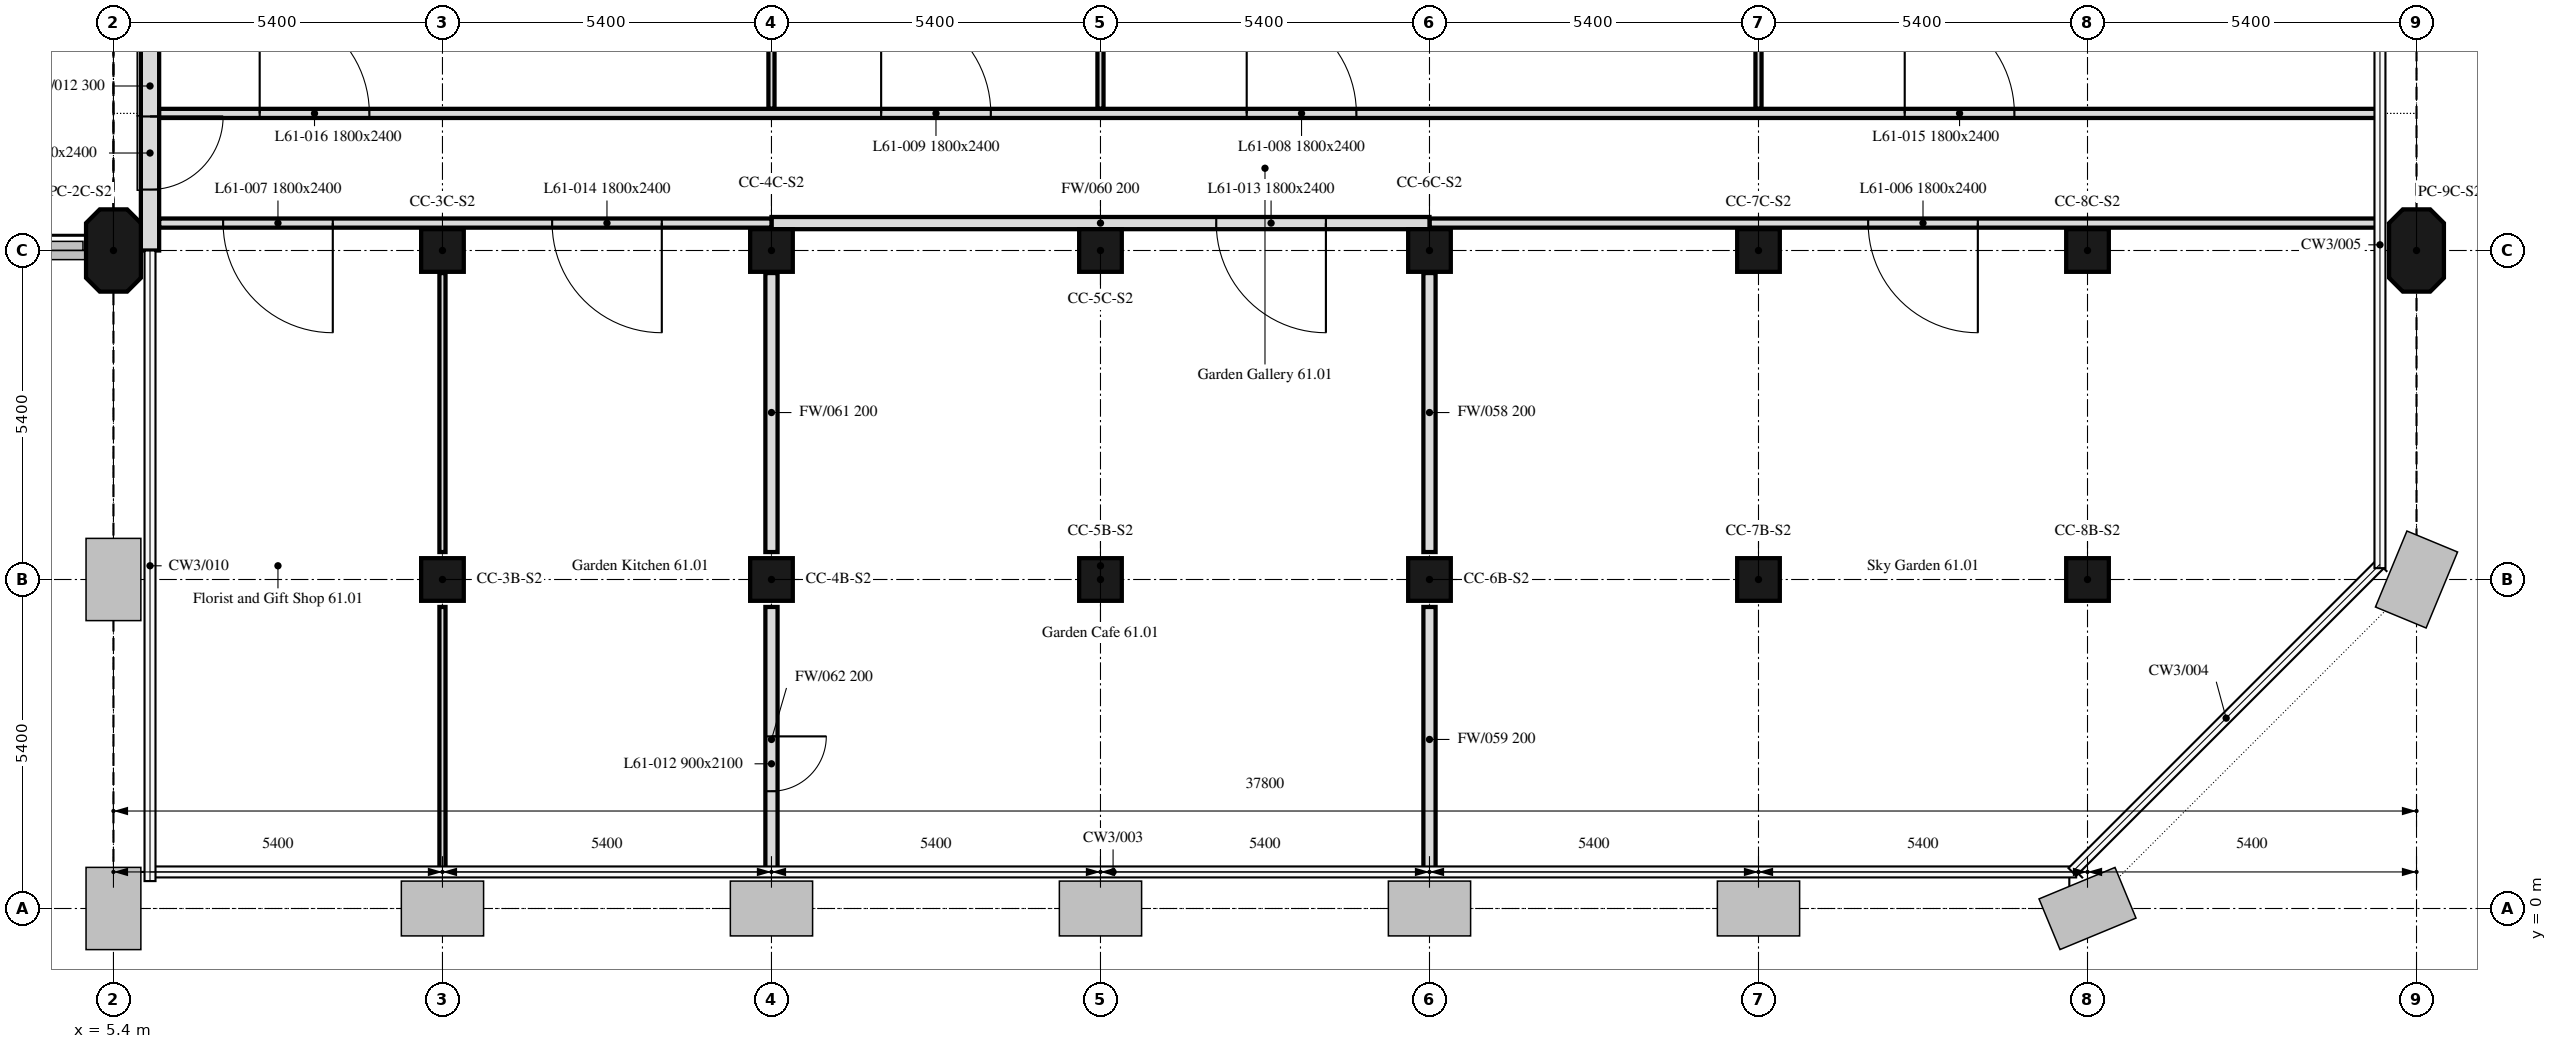
"""IFC4 building model, lengths in metres.
Left out: names, types, materials, properties, quantities, classifications, styles, units other than length and angle.
Written with IfcOpenShell. Run it as: python <this file> out.ifc"""

import sys

from ifc_helpers import new_model, si_unit, direction, frame, frame_2d, origin, origin_2d, place, context, subcontext, project, spatial, polyline, rectangle, outline, extrude, element, fill, save


model = new_model("IFC4")
c1 = context("Model", 3, precision=1e-05, world=origin(), true_north=direction((0.0, 1.0)))
c2 = subcontext(c1, "Body", "Model", "MODEL_VIEW")
j1 = project(units=[si_unit("LENGTHUNIT", "METRE"), si_unit("PLANEANGLEUNIT", "RADIAN")], contexts=[c1])
p1 = place(None, origin())
s1 = spatial("IfcSite", under=j1, at=p1, CompositionType="ELEMENT")
p2 = place(p1, origin())
s2 = spatial("IfcBuilding", under=s1, at=p2, CompositionType="ELEMENT")
p3 = place(p2, frame((0.0, 0.0, 250.9)))
s3 = spatial("IfcBuildingStorey", under=s2, at=p3, CompositionType="ELEMENT", Elevation=250.9)
for number, where, z_axis, x_axis in (
    (1, (10.8, 5.4, 0.0), (0.0, 0.0, 1.0), (1.0, 0.0, 0.0)),
    (2, (16.2, 5.4, 0.0), (0.0, 0.0, 1.0), (1.0, 0.0, 0.0)),
    (3, (21.6, 5.4, 0.0), (0.0, 0.0, 1.0), (1.0, 0.0, 0.0)),
    (4, (27.0, 5.4, 0.0), (0.0, 0.0, 1.0), (1.0, 0.0, 0.0)),
    (5, (32.4, 5.4, 0.0), (0.0, 0.0, 1.0), (1.0, 0.0, 0.0)),
    (6, (37.8, 5.4, 0.0), (0.0, 0.0, 1.0), (1.0, 0.0, 0.0)),
):
    element("IfcColumn", number, at=place(p3, frame(where, z_axis=z_axis, x_axis=x_axis)), inside=s3, PredefinedType="COLUMN", context=c2, shape_type="SweptSolid", body=[
        extrude(rectangle(XDim=0.7, YDim=0.7, at=origin_2d()), origin(), (0.0, 0.0, 1.0), 4.5),
    ])
p4 = place(p3, frame((5.4, 10.8, 0.0), z_axis=(0.0, 0.0, 1.0), x_axis=(0.0, 1.0, 0.0)))
e7 = element("IfcColumn", 7, at=p4, inside=s3, PredefinedType="COLUMN", context=c2, shape_type="SweptSolid", body=[
    extrude(outline(polyline([(-0.45, -0.45), (0.45, -0.45), (0.675, -0.225), (0.675, 0.225), (0.45, 0.45), (-0.45, 0.45), (-0.675, 0.225), (-0.675, -0.225), (-0.45, -0.45)])), origin(), (0.0, 0.0, 1.0), 4.5),
])
for number, where, z_axis, x_axis in (
    (8, (10.8, 10.8, 0.0), (0.0, 0.0, 1.0), (1.0, 0.0, 0.0)),
    (9, (16.2, 10.8, 0.0), (0.0, 0.0, 1.0), (1.0, 0.0, 0.0)),
    (10, (21.6, 10.8, 0.0), (0.0, 0.0, 1.0), (1.0, 0.0, 0.0)),
    (11, (27.0, 10.8, 0.0), (0.0, 0.0, 1.0), (1.0, 0.0, 0.0)),
    (12, (32.4, 10.8, 0.0), (0.0, 0.0, 1.0), (1.0, 0.0, 0.0)),
    (13, (37.8, 10.8, 0.0), (0.0, 0.0, 1.0), (1.0, 0.0, 0.0)),
):
    element("IfcColumn", number, at=place(p3, frame(where, z_axis=z_axis, x_axis=x_axis)), inside=s3, PredefinedType="COLUMN", context=c2, shape_type="SweptSolid", body=[
        extrude(rectangle(XDim=0.7, YDim=0.7, at=origin_2d()), origin(), (0.0, 0.0, 1.0), 4.5),
    ])
p5 = place(p3, frame((43.2, 10.8, 0.0), z_axis=(0.0, 0.0, 1.0), x_axis=(0.0, 1.0, 0.0)))
e14 = element("IfcColumn", 14, at=p5, inside=s3, PredefinedType="COLUMN", context=c2, shape_type="SweptSolid", body=[
    extrude(outline(polyline([(-0.45, -0.45), (0.45, -0.45), (0.675, -0.225), (0.675, 0.225), (0.45, 0.45), (-0.45, 0.45), (-0.675, 0.225), (-0.675, -0.225), (-0.45, -0.45)])), origin(), (0.0, 0.0, 1.0), 4.5),
])
p6 = place(p3, frame((6.0, 16.2, 0.0), z_axis=(0.0, 0.0, 1.0), x_axis=(0.0, -1.0, 0.0)))
e15 = element("IfcWall", 15, at=p6, inside=s3, PredefinedType="SOLIDWALL", context=c2, shape_type="SweptSolid", body=[
    extrude(rectangle(XDim=5.4, YDim=0.3, at=frame_2d((2.7, 0.0))), origin(), (0.0, 0.0, 1.0), 4.5),
])
p7 = place(p6, frame((3.2, 0.0, 0.0)))
e16 = element("IfcOpeningElement", 16, at=p7, cuts=e15, PredefinedType="OPENING", context=c2, shape_type="SweptSolid", body=[
    extrude(rectangle(XDim=1.2, YDim=2.4, at=frame_2d((0.6, 1.2))), frame((0.0, 0.16, 0.0), z_axis=(0.0, -1.0, 0.0), x_axis=(1.0, 0.0, 0.0)), (0.0, 0.0, 1.0), 0.32),
])
p8 = place(p3, frame((42.6, 11.25, 0.0), z_axis=(0.0, 0.0, 1.0), x_axis=(-1.0, 0.0, 0.0)))
e17 = element("IfcWall", 17, at=p8, inside=s3, PredefinedType="PARTITIONING", context=c2, shape_type="SweptSolid", body=[
    extrude(rectangle(XDim=15.6, YDim=0.15, at=frame_2d((7.8, 0.0))), origin(), (0.0, 0.0, 1.0), 3.75),
])
p9 = place(p8, frame((6.6, 0.0, 0.0)))
e18 = element("IfcOpeningElement", 18, at=p9, cuts=e17, PredefinedType="OPENING", context=c2, shape_type="SweptSolid", body=[
    extrude(rectangle(XDim=1.8, YDim=2.4, at=frame_2d((0.9, 1.2))), frame((0.0, 0.075, 0.0), z_axis=(0.0, -1.0, 0.0), x_axis=(1.0, 0.0, 0.0)), (0.0, 0.0, 1.0), 0.15),
])
p10 = place(p3, frame((27.0, 10.43, 0.0), z_axis=(0.0, 0.0, 1.0), x_axis=(0.0, -1.0, 0.0)))
e19 = element("IfcWall", 19, at=p10, inside=s3, PredefinedType="PARTITIONING", context=c2, shape_type="SweptSolid", body=[
    extrude(rectangle(XDim=4.579, YDim=0.2, at=frame_2d((2.29, 0.0))), origin(), (0.0, 0.0, 1.0), 3.75),
])
p11 = place(p3, frame((27.0, 4.949, 0.0), z_axis=(0.0, 0.0, 1.0), x_axis=(0.0, -1.0, 0.0)))
e20 = element("IfcWall", 20, at=p11, inside=s3, PredefinedType="PARTITIONING", context=c2, shape_type="SweptSolid", body=[
    extrude(rectangle(XDim=4.349, YDim=0.2, at=frame_2d((2.175, 0.0))), origin(), (0.0, 0.0, 1.0), 3.75),
])
p12 = place(p3, frame((27.0, 11.25, 0.0), z_axis=(0.0, 0.0, 1.0), x_axis=(-1.0, 0.0, 0.0)))
e21 = element("IfcWall", 21, at=p12, inside=s3, PredefinedType="PARTITIONING", context=c2, shape_type="SweptSolid", body=[
    extrude(rectangle(XDim=10.8, YDim=0.2, at=frame_2d((5.4, 0.0))), origin(), (0.0, 0.0, 1.0), 3.75),
])
p13 = place(p12, frame((1.7, 0.0, 0.0)))
e22 = element("IfcOpeningElement", 22, at=p13, cuts=e21, PredefinedType="OPENING", context=c2, shape_type="SweptSolid", body=[
    extrude(rectangle(XDim=1.8, YDim=2.4, at=frame_2d((0.9, 1.2))), frame((0.0, 0.1, 0.0), z_axis=(0.0, -1.0, 0.0), x_axis=(1.0, 0.0, 0.0)), (0.0, 0.0, 1.0), 0.2),
])
p14 = place(p3, frame((16.2, 10.43, 0.0), z_axis=(0.0, 0.0, 1.0), x_axis=(0.0, -1.0, 0.0)))
e23 = element("IfcWall", 23, at=p14, inside=s3, PredefinedType="PARTITIONING", context=c2, shape_type="SweptSolid", body=[
    extrude(rectangle(XDim=4.579, YDim=0.2, at=frame_2d((2.29, 0.0))), origin(), (0.0, 0.0, 1.0), 3.75),
])
p15 = place(p3, frame((16.2, 4.949, 0.0), z_axis=(0.0, 0.0, 1.0), x_axis=(0.0, -1.0, 0.0)))
e24 = element("IfcWall", 24, at=p15, inside=s3, PredefinedType="PARTITIONING", context=c2, shape_type="SweptSolid", body=[
    extrude(rectangle(XDim=4.349, YDim=0.2, at=frame_2d((2.175, 0.0))), origin(), (0.0, 0.0, 1.0), 3.75),
])
p16 = place(p15, frame((2.124, 0.0, 0.0)))
e25 = element("IfcOpeningElement", 25, at=p16, cuts=e24, PredefinedType="OPENING", context=c2, shape_type="SweptSolid", body=[
    extrude(rectangle(XDim=0.9, YDim=2.1, at=frame_2d((0.45, 1.05))), frame((0.0, 0.1, 0.0), z_axis=(0.0, -1.0, 0.0), x_axis=(1.0, 0.0, 0.0)), (0.0, 0.0, 1.0), 0.2),
])
p17 = place(p3, frame((10.8, 10.43, 0.0), z_axis=(0.0, 0.0, 1.0), x_axis=(0.0, -1.0, 0.0)))
e26 = element("IfcWall", 26, at=p17, inside=s3, PredefinedType="PARTITIONING", context=c2, shape_type="SweptSolid", body=[
    extrude(rectangle(XDim=4.579, YDim=0.1, at=frame_2d((2.29, 0.0))), origin(), (0.0, 0.0, 1.0), 3.75),
])
p18 = place(p3, frame((10.8, 4.949, 0.0), z_axis=(0.0, 0.0, 1.0), x_axis=(0.0, -1.0, 0.0)))
e27 = element("IfcWall", 27, at=p18, inside=s3, PredefinedType="PARTITIONING", context=c2, shape_type="SweptSolid", body=[
    extrude(rectangle(XDim=4.349, YDim=0.1, at=frame_2d((2.175, 0.0))), origin(), (0.0, 0.0, 1.0), 3.75),
])
p19 = place(p3, frame((16.2, 11.25, 0.0), z_axis=(0.0, 0.0, 1.0), x_axis=(-1.0, 0.0, 0.0)))
e28 = element("IfcWall", 28, at=p19, inside=s3, PredefinedType="PARTITIONING", context=c2, shape_type="SweptSolid", body=[
    extrude(rectangle(XDim=10.049, YDim=0.15, at=frame_2d((5.024, 0.0))), origin(), (0.0, 0.0, 1.0), 3.75),
])
p20 = place(p19, frame((7.2, 0.0, 0.0)))
e29 = element("IfcOpeningElement", 29, at=p20, cuts=e28, PredefinedType="OPENING", context=c2, shape_type="SweptSolid", body=[
    extrude(rectangle(XDim=1.8, YDim=2.4, at=frame_2d((0.9, 1.2))), frame((0.0, 0.075, 0.0), z_axis=(0.0, -1.0, 0.0), x_axis=(1.0, 0.0, 0.0)), (0.0, 0.0, 1.0), 0.15),
])
p21 = place(p19, frame((1.8, 0.0, 0.0)))
e30 = element("IfcOpeningElement", 30, at=p21, cuts=e28, PredefinedType="OPENING", context=c2, shape_type="SweptSolid", body=[
    extrude(rectangle(XDim=1.8, YDim=2.4, at=frame_2d((0.9, 1.2))), frame((0.0, 0.075, 0.0), z_axis=(0.0, -1.0, 0.0), x_axis=(1.0, 0.0, 0.0)), (0.0, 0.0, 1.0), 0.15),
])
p22 = place(p3, frame((32.4, 13.125, 0.0), z_axis=(0.0, 0.0, 1.0), x_axis=(0.0, 1.0, 0.0)))
e31 = element("IfcWall", 31, at=p22, inside=s3, PredefinedType="PARTITIONING", context=c2, shape_type="SweptSolid", body=[
    extrude(rectangle(XDim=3.075, YDim=0.1, at=frame_2d((1.538, 0.0))), origin(), (0.0, 0.0, 1.0), 3.75),
])
p23 = place(p3, frame((21.6, 15.78, 0.0), z_axis=(0.0, 0.0, 1.0), x_axis=(0.0, -1.0, 0.0)))
e32 = element("IfcWall", 32, at=p23, inside=s3, PredefinedType="PARTITIONING", context=c2, shape_type="SweptSolid", body=[
    extrude(rectangle(XDim=2.655, YDim=0.1, at=frame_2d((1.328, 0.0))), origin(), (0.0, 0.0, 1.0), 3.75),
])
p24 = place(p3, frame((16.2, 16.2, 0.0), z_axis=(0.0, 0.0, 1.0), x_axis=(0.0, -1.0, 0.0)))
e33 = element("IfcWall", 33, at=p24, inside=s3, PredefinedType="PARTITIONING", context=c2, shape_type="SweptSolid", body=[
    extrude(rectangle(XDim=3.075, YDim=0.1, at=frame_2d((1.538, 0.0))), origin(), (0.0, 0.0, 1.0), 3.75),
])
p25 = place(p3, frame((6.151, 13.05, 0.0), z_axis=(0.0, 0.0, 1.0), x_axis=(1.0, 0.0, 0.0)))
e34 = element("IfcWall", 34, at=p25, inside=s3, PredefinedType="PARTITIONING", context=c2, shape_type="SweptSolid", body=[
    extrude(rectangle(XDim=36.449, YDim=0.15, at=frame_2d((18.225, 0.0))), origin(), (0.0, 0.0, 1.0), 3.75),
])
p26 = place(p25, frame((17.849, 0.0, 0.0)))
e35 = element("IfcOpeningElement", 35, at=p26, cuts=e34, PredefinedType="OPENING", context=c2, shape_type="SweptSolid", body=[
    extrude(rectangle(XDim=1.8, YDim=2.4, at=frame_2d((0.9, 1.2))), frame((0.0, 0.075, 0.0), z_axis=(0.0, -1.0, 0.0), x_axis=(1.0, 0.0, 0.0)), (0.0, 0.0, 1.0), 0.15),
])
p27 = place(p25, frame((11.849, 0.0, 0.0)))
e36 = element("IfcOpeningElement", 36, at=p27, cuts=e34, PredefinedType="OPENING", context=c2, shape_type="SweptSolid", body=[
    extrude(rectangle(XDim=1.8, YDim=2.4, at=frame_2d((0.9, 1.2))), frame((0.0, 0.075, 0.0), z_axis=(0.0, -1.0, 0.0), x_axis=(1.0, 0.0, 0.0)), (0.0, 0.0, 1.0), 0.15),
])
p28 = place(p25, frame((28.649, 0.0, 0.0)))
e37 = element("IfcOpeningElement", 37, at=p28, cuts=e34, PredefinedType="OPENING", context=c2, shape_type="SweptSolid", body=[
    extrude(rectangle(XDim=1.8, YDim=2.4, at=frame_2d((0.9, 1.2))), frame((0.0, 0.075, 0.0), z_axis=(0.0, -1.0, 0.0), x_axis=(1.0, 0.0, 0.0)), (0.0, 0.0, 1.0), 0.15),
])
p29 = place(p25, frame((1.649, 0.0, 0.0)))
e38 = element("IfcOpeningElement", 38, at=p29, cuts=e34, PredefinedType="OPENING", context=c2, shape_type="SweptSolid", body=[
    extrude(rectangle(XDim=1.8, YDim=2.4, at=frame_2d((0.9, 1.2))), frame((0.0, 0.075, 0.0), z_axis=(0.0, -1.0, 0.0), x_axis=(1.0, 0.0, 0.0)), (0.0, 0.0, 1.0), 0.15),
])
p30 = place(p7, origin())
e39 = element("IfcDoor", 39, at=p30, inside=s3, OperationType="SINGLE_SWING_LEFT", PredefinedType="DOOR", context=c2, shape_type="SweptSolid", body=[
    extrude(rectangle(XDim=1.2, YDim=2.4, at=frame_2d((0.6, 1.2))), frame((0.0, 0.025, 0.0), z_axis=(0.0, -1.0, 0.0), x_axis=(1.0, 0.0, 0.0)), (0.0, 0.0, 1.0), 0.05),
])
fill(e16, e39)
p31 = place(p9, origin())
e40 = element("IfcDoor", 40, at=p31, inside=s3, OperationType="DOUBLE_DOOR_SINGLE_SWING", PredefinedType="DOOR", context=c2, shape_type="SweptSolid", body=[
    extrude(rectangle(XDim=1.8, YDim=2.4, at=frame_2d((0.9, 1.2))), frame((0.0, 0.025, 0.0), z_axis=(0.0, -1.0, 0.0), x_axis=(1.0, 0.0, 0.0)), (0.0, 0.0, 1.0), 0.05),
])
fill(e18, e40)
p32 = place(p20, origin())
e41 = element("IfcDoor", 41, at=p32, inside=s3, OperationType="DOUBLE_DOOR_SINGLE_SWING", PredefinedType="DOOR", context=c2, shape_type="SweptSolid", body=[
    extrude(rectangle(XDim=1.8, YDim=2.4, at=frame_2d((0.9, 1.2))), frame((0.0, 0.025, 0.0), z_axis=(0.0, -1.0, 0.0), x_axis=(1.0, 0.0, 0.0)), (0.0, 0.0, 1.0), 0.05),
])
fill(e29, e41)
p33 = place(p26, origin())
e42 = element("IfcDoor", 42, at=p33, inside=s3, OperationType="DOUBLE_DOOR_SINGLE_SWING", PredefinedType="DOOR", context=c2, shape_type="SweptSolid", body=[
    extrude(rectangle(XDim=1.8, YDim=2.4, at=frame_2d((0.9, 1.2))), frame((0.0, 0.025, 0.0), z_axis=(0.0, -1.0, 0.0), x_axis=(1.0, 0.0, 0.0)), (0.0, 0.0, 1.0), 0.05),
])
fill(e35, e42)
p34 = place(p27, origin())
e43 = element("IfcDoor", 43, at=p34, inside=s3, OperationType="DOUBLE_DOOR_SINGLE_SWING", PredefinedType="DOOR", context=c2, shape_type="SweptSolid", body=[
    extrude(rectangle(XDim=1.8, YDim=2.4, at=frame_2d((0.9, 1.2))), frame((0.0, 0.025, 0.0), z_axis=(0.0, -1.0, 0.0), x_axis=(1.0, 0.0, 0.0)), (0.0, 0.0, 1.0), 0.05),
])
fill(e36, e43)
p35 = place(p16, origin())
e44 = element("IfcDoor", 44, at=p35, inside=s3, OperationType="SINGLE_SWING_RIGHT", PredefinedType="DOOR", context=c2, shape_type="SweptSolid", body=[
    extrude(rectangle(XDim=0.9, YDim=2.1, at=frame_2d((0.45, 1.05))), frame((0.0, 0.025, 0.0), z_axis=(0.0, -1.0, 0.0), x_axis=(1.0, 0.0, 0.0)), (0.0, 0.0, 1.0), 0.05),
])
fill(e25, e44)
p36 = place(p13, origin())
e45 = element("IfcDoor", 45, at=p36, inside=s3, OperationType="DOUBLE_DOOR_SINGLE_SWING", PredefinedType="DOOR", context=c2, shape_type="SweptSolid", body=[
    extrude(rectangle(XDim=1.8, YDim=2.4, at=frame_2d((0.9, 1.2))), frame((0.0, 0.025, 0.0), z_axis=(0.0, -1.0, 0.0), x_axis=(1.0, 0.0, 0.0)), (0.0, 0.0, 1.0), 0.05),
])
fill(e22, e45)
p37 = place(p21, origin())
e46 = element("IfcDoor", 46, at=p37, inside=s3, OperationType="DOUBLE_DOOR_SINGLE_SWING", PredefinedType="DOOR", context=c2, shape_type="SweptSolid", body=[
    extrude(rectangle(XDim=1.8, YDim=2.4, at=frame_2d((0.9, 1.2))), frame((0.0, 0.025, 0.0), z_axis=(0.0, -1.0, 0.0), x_axis=(1.0, 0.0, 0.0)), (0.0, 0.0, 1.0), 0.05),
])
fill(e30, e46)
p38 = place(p28, origin())
e47 = element("IfcDoor", 47, at=p38, inside=s3, OperationType="DOUBLE_DOOR_SINGLE_SWING", PredefinedType="DOOR", context=c2, shape_type="SweptSolid", body=[
    extrude(rectangle(XDim=1.8, YDim=2.4, at=frame_2d((0.9, 1.2))), frame((0.0, 0.025, 0.0), z_axis=(0.0, -1.0, 0.0), x_axis=(1.0, 0.0, 0.0)), (0.0, 0.0, 1.0), 0.05),
])
fill(e37, e47)
p39 = place(p29, origin())
e48 = element("IfcDoor", 48, at=p39, inside=s3, OperationType="DOUBLE_DOOR_SINGLE_SWING", PredefinedType="DOOR", context=c2, shape_type="SweptSolid", body=[
    extrude(rectangle(XDim=1.8, YDim=2.4, at=frame_2d((0.9, 1.2))), frame((0.0, 0.025, 0.0), z_axis=(0.0, -1.0, 0.0), x_axis=(1.0, 0.0, 0.0)), (0.0, 0.0, 1.0), 0.05),
])
fill(e38, e48)
save(model, sys.argv[1])
